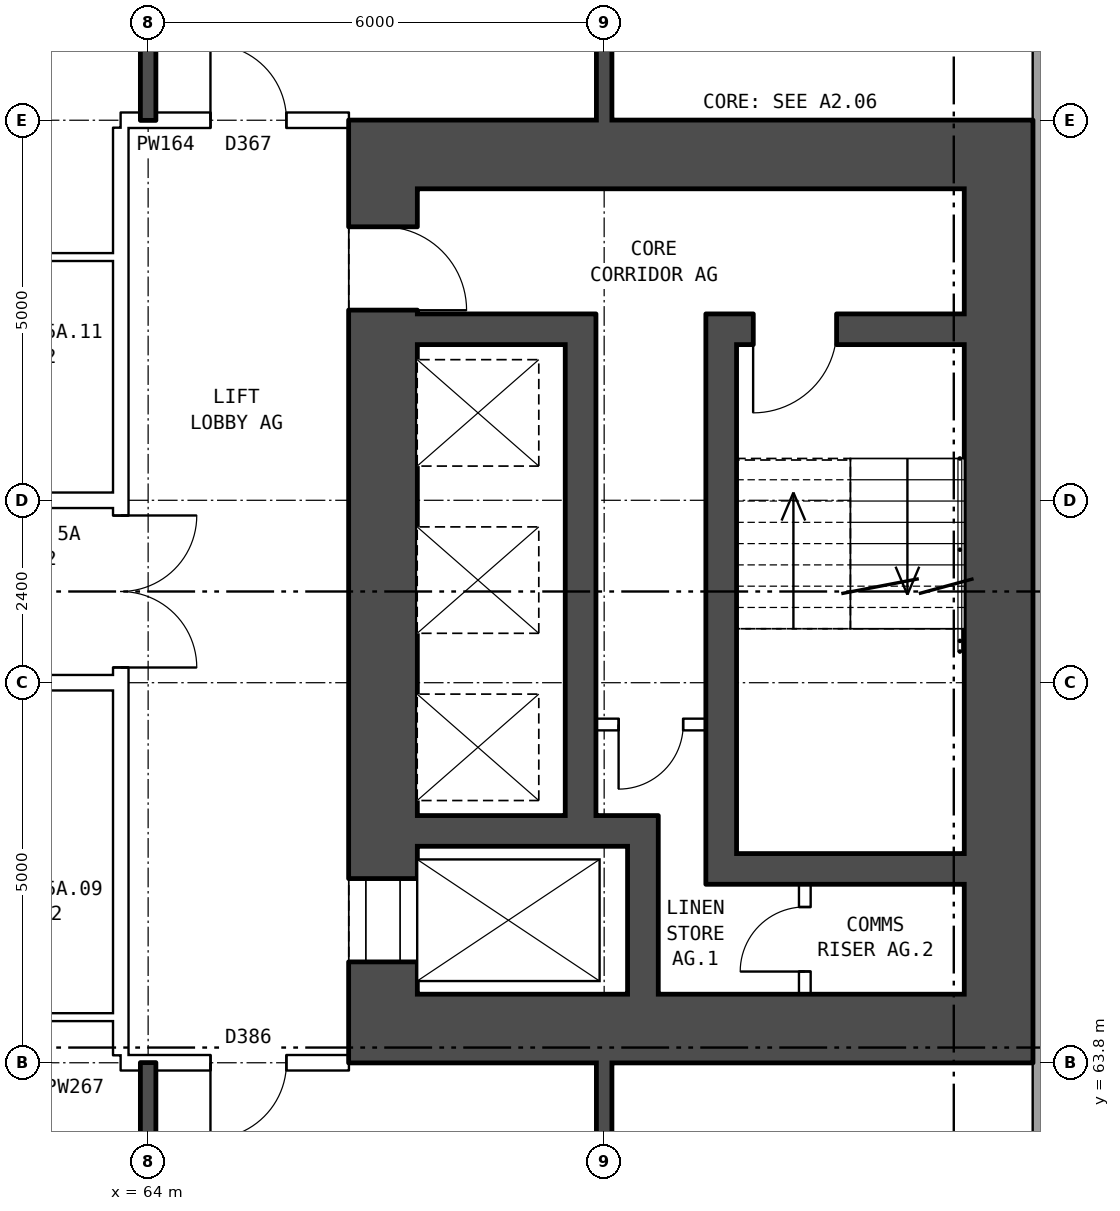
"""IFC4 building model, lengths in metres.
Left out: names, types, materials, properties, quantities, classifications, styles, units other than length and angle.
Written with IfcOpenShell. Run it as: python <this file> out.ifc"""

import sys

from ifc_helpers import new_model, si_unit, direction, frame, frame_2d, origin, place, context, subcontext, project, spatial, rectangle, extrude, element, fill, save


model = new_model("IFC4")
c1 = context("Model", 3, precision=1e-05, world=origin(), true_north=direction((0.0, 1.0)))
c2 = subcontext(c1, "Body", "Model", "MODEL_VIEW")
j1 = project(units=[si_unit("LENGTHUNIT", "METRE"), si_unit("PLANEANGLEUNIT", "RADIAN")], contexts=[c1])
p1 = place(None, origin())
s1 = spatial("IfcSite", under=j1, at=p1, CompositionType="ELEMENT")
p2 = place(p1, origin())
s2 = spatial("IfcBuilding", under=s1, at=p2, CompositionType="ELEMENT")
p3 = place(p2, frame((0.0, 0.0, 22.6)))
s3 = spatial("IfcBuildingStorey", under=s2, at=p3, CompositionType="ELEMENT", Elevation=22.6)
p4 = place(p3, frame((75.82, 57.075, 0.0), z_axis=(0.0, 0.0, 1.0), x_axis=(0.0, 1.0, 0.0)))
e1 = element("IfcWall", 1, at=p4, inside=s3, PredefinedType="STANDARD", context=c2, shape_type="SweptSolid", body=[
    extrude(rectangle(XDim=25.851, YDim=0.36, at=frame_2d((12.925, 0.0))), origin(), (0.0, 0.0, 1.0), 2.85),
])
p5 = place(p4, frame((1.625, 0.0, 0.8)))
e2 = element("IfcOpeningElement", 2, at=p5, cuts=e1, PredefinedType="OPENING", context=c2, shape_type="SweptSolid", body=[
    extrude(rectangle(XDim=1.6, YDim=1.8, at=frame_2d((0.8, 0.9))), frame((0.0, 0.19, 0.0), z_axis=(0.0, -1.0, 0.0), x_axis=(1.0, 0.0, 0.0)), (0.0, 0.0, 1.0), 0.38),
])
p6 = place(p4, frame((3.525, 0.0, 1.7)))
e3 = element("IfcOpeningElement", 3, at=p6, cuts=e1, PredefinedType="OPENING", context=c2, shape_type="SweptSolid", body=[
    extrude(rectangle(XDim=1.4, YDim=0.9, at=frame_2d((0.7, 0.45))), frame((0.0, 0.19, 0.0), z_axis=(0.0, -1.0, 0.0), x_axis=(1.0, 0.0, 0.0)), (0.0, 0.0, 1.0), 0.38),
])
p7 = place(p4, frame((20.825, 0.0, 1.7)))
e4 = element("IfcOpeningElement", 4, at=p7, cuts=e1, PredefinedType="OPENING", context=c2, shape_type="SweptSolid", body=[
    extrude(rectangle(XDim=1.4, YDim=0.9, at=frame_2d((0.7, 0.45))), frame((0.0, 0.19, 0.0), z_axis=(0.0, -1.0, 0.0), x_axis=(1.0, 0.0, 0.0)), (0.0, 0.0, 1.0), 0.38),
])
p8 = place(p4, frame((22.625, 0.0, 0.8)))
e5 = element("IfcOpeningElement", 5, at=p8, cuts=e1, PredefinedType="OPENING", context=c2, shape_type="SweptSolid", body=[
    extrude(rectangle(XDim=1.6, YDim=1.8, at=frame_2d((0.8, 0.9))), frame((0.0, 0.19, 0.0), z_axis=(0.0, -1.0, 0.0), x_axis=(1.0, 0.0, 0.0)), (0.0, 0.0, 1.0), 0.38),
])
p9 = place(p3, frame((67.09, 64.7, 0.0), z_axis=(0.0, 0.0, 1.0), x_axis=(0.0, 1.0, 0.0)))
e6 = element("IfcWall", 6, at=p9, inside=s3, PredefinedType="SHEAR", context=c2, shape_type="SweptSolid", body=[
    extrude(rectangle(XDim=10.6, YDim=0.9, at=frame_2d((5.3, 0.0))), origin(), (0.0, 0.0, 1.0), 2.85),
])
p10 = place(p9, frame((0.425, 0.0, 0.0)))
e7 = element("IfcOpeningElement", 7, at=p10, cuts=e6, PredefinedType="OPENING", context=c2, shape_type="SweptSolid", body=[
    extrude(rectangle(XDim=1.1, YDim=2.1, at=frame_2d((0.55, 1.05))), frame((0.0, 0.46, 0.0), z_axis=(0.0, -1.0, 0.0), x_axis=(1.0, 0.0, 0.0)), (0.0, 0.0, 1.0), 0.92),
])
p11 = place(p9, frame((9.0, 0.0, 0.0)))
e8 = element("IfcOpeningElement", 8, at=p11, cuts=e6, PredefinedType="OPENING", context=c2, shape_type="SweptSolid", body=[
    extrude(rectangle(XDim=1.1, YDim=2.1, at=frame_2d((0.55, 1.05))), frame((0.0, 0.46, 0.0), z_axis=(0.0, -1.0, 0.0), x_axis=(1.0, 0.0, 0.0)), (0.0, 0.0, 1.0), 0.92),
])
p12 = place(p3, frame((75.19, 64.7, 0.0), z_axis=(0.0, 0.0, 1.0), x_axis=(0.0, 1.0, 0.0)))
e9 = element("IfcWall", 9, at=p12, inside=s3, PredefinedType="SHEAR", context=c2, shape_type="SweptSolid", body=[
    extrude(rectangle(XDim=10.6, YDim=0.9, at=frame_2d((5.3, 0.0))), origin(), (0.0, 0.0, 1.0), 2.85),
])
for number, where, z_axis, x_axis in (
    (10, (66.64, 64.25, 0.0), (0.0, 0.0, 1.0), (1.0, 0.0, 0.0)),
    (11, (66.64, 75.75, 0.0), (0.0, 0.0, 1.0), (1.0, 0.0, 0.0)),
):
    element("IfcWall", number, at=place(p3, frame(where, z_axis=z_axis, x_axis=x_axis)), inside=s3, PredefinedType="SHEAR", context=c2, shape_type="SweptSolid", body=[
        extrude(rectangle(XDim=9.0, YDim=0.9, at=frame_2d((4.5, 0.0))), origin(), (0.0, 0.0, 1.0), 2.85),
    ])
p13 = place(p3, frame((71.74, 66.35, 0.0), z_axis=(0.0, 0.0, 1.0), x_axis=(1.0, 0.0, 0.0)))
e12 = element("IfcWall", 12, at=p13, inside=s3, PredefinedType="SHEAR", context=c2, shape_type="SweptSolid", body=[
    extrude(rectangle(XDim=3.0, YDim=0.4, at=frame_2d((1.5, 0.0))), origin(), (0.0, 0.0, 1.0), 2.85),
])
p14 = place(p3, frame((67.54, 66.85, 0.0), z_axis=(0.0, 0.0, 1.0), x_axis=(1.0, 0.0, 0.0)))
e13 = element("IfcWall", 13, at=p14, inside=s3, PredefinedType="SHEAR", context=c2, shape_type="SweptSolid", body=[
    extrude(rectangle(XDim=3.17, YDim=0.4, at=frame_2d((1.585, 0.0))), origin(), (0.0, 0.0, 1.0), 2.85),
])
p15 = place(p3, frame((69.89, 68.25, 0.0), z_axis=(0.0, 0.0, 1.0), x_axis=(1.0, 0.0, 0.0)))
e14 = element("IfcWall", 14, at=p15, inside=s3, PredefinedType="PARTITIONING", context=c2, shape_type="SweptSolid", body=[
    extrude(rectangle(XDim=1.45, YDim=0.15, at=frame_2d((0.725, 0.0))), origin(), (0.0, 0.0, 1.0), 2.85),
])
p16 = place(p15, frame((0.3, 0.0, 0.0)))
e15 = element("IfcOpeningElement", 15, at=p16, cuts=e14, PredefinedType="OPENING", context=c2, shape_type="SweptSolid", body=[
    extrude(rectangle(XDim=0.85, YDim=2.1, at=frame_2d((0.425, 1.05))), frame((0.0, 0.085, 0.0), z_axis=(0.0, -1.0, 0.0), x_axis=(1.0, 0.0, 0.0)), (0.0, 0.0, 1.0), 0.17),
])
p17 = place(p3, frame((67.54, 73.45, 0.0), z_axis=(0.0, 0.0, 1.0), x_axis=(1.0, 0.0, 0.0)))
e16 = element("IfcWall", 16, at=p17, inside=s3, PredefinedType="SHEAR", context=c2, shape_type="SweptSolid", body=[
    extrude(rectangle(XDim=1.95, YDim=0.4, at=frame_2d((0.975, 0.0))), origin(), (0.0, 0.0, 1.0), 2.85),
])
p18 = place(p3, frame((71.74, 73.45, 0.0), z_axis=(0.0, 0.0, 1.0), x_axis=(1.0, 0.0, 0.0)))
e17 = element("IfcWall", 17, at=p18, inside=s3, PredefinedType="SHEAR", context=c2, shape_type="SweptSolid", body=[
    extrude(rectangle(XDim=3.0, YDim=0.4, at=frame_2d((1.5, 0.0))), origin(), (0.0, 0.0, 1.0), 2.85),
])
p19 = place(p18, frame((0.22, 0.0, 0.0)))
e18 = element("IfcOpeningElement", 18, at=p19, cuts=e17, PredefinedType="OPENING", context=c2, shape_type="SweptSolid", body=[
    extrude(rectangle(XDim=1.1, YDim=2.1, at=frame_2d((0.55, 1.05))), frame((0.0, 0.21, 0.0), z_axis=(0.0, -1.0, 0.0), x_axis=(1.0, 0.0, 0.0)), (0.0, 0.0, 1.0), 0.42),
])
p20 = place(p3, frame((69.69, 67.05, 0.0), z_axis=(0.0, 0.0, 1.0), x_axis=(0.0, 1.0, 0.0)))
e19 = element("IfcWall", 19, at=p20, inside=s3, PredefinedType="SHEAR", context=c2, shape_type="SweptSolid", body=[
    extrude(rectangle(XDim=6.6, YDim=0.4, at=frame_2d((3.3, 0.0))), origin(), (0.0, 0.0, 1.0), 2.85),
])
p21 = place(p3, frame((70.51, 64.7, 0.0), z_axis=(0.0, 0.0, 1.0), x_axis=(0.0, 1.0, 0.0)))
e20 = element("IfcWall", 20, at=p21, inside=s3, PredefinedType="SHEAR", context=c2, shape_type="SweptSolid", body=[
    extrude(rectangle(XDim=1.95, YDim=0.4, at=frame_2d((0.975, 0.0))), origin(), (0.0, 0.0, 1.0), 2.85),
])
p22 = place(p3, frame((71.54, 66.15, 0.0), z_axis=(0.0, 0.0, 1.0), x_axis=(0.0, 1.0, 0.0)))
e21 = element("IfcWall", 21, at=p22, inside=s3, PredefinedType="SHEAR", context=c2, shape_type="SweptSolid", body=[
    extrude(rectangle(XDim=7.5, YDim=0.4, at=frame_2d((3.75, 0.0))), origin(), (0.0, 0.0, 1.0), 2.85),
])
p23 = place(p3, frame((72.64, 64.7, 0.0), z_axis=(0.0, 0.0, 1.0), x_axis=(0.0, 1.0, 0.0)))
e22 = element("IfcWall", 22, at=p23, inside=s3, PredefinedType="PARTITIONING", context=c2, shape_type="SweptSolid", body=[
    extrude(rectangle(XDim=1.45, YDim=0.15, at=frame_2d((0.725, 0.0))), origin(), (0.0, 0.0, 1.0), 2.85),
])
p24 = place(p23, frame((0.3, 0.0, 0.0)))
e23 = element("IfcOpeningElement", 23, at=p24, cuts=e22, PredefinedType="OPENING", context=c2, shape_type="SweptSolid", body=[
    extrude(rectangle(XDim=0.85, YDim=2.1, at=frame_2d((0.425, 1.05))), frame((0.0, 0.085, 0.0), z_axis=(0.0, -1.0, 0.0), x_axis=(1.0, 0.0, 0.0)), (0.0, 0.0, 1.0), 0.17),
])
p25 = place(p3, frame((63.64, 63.9, 0.0), z_axis=(0.0, 0.0, 1.0), x_axis=(0.0, 1.0, 0.0)))
e24 = element("IfcWall", 24, at=p25, inside=s3, PredefinedType="PARTITIONING", context=c2, shape_type="SweptSolid", body=[
    extrude(rectangle(XDim=12.2, YDim=0.2, at=frame_2d((6.1, 0.0))), origin(), (0.0, 0.0, 1.0), 2.85),
])
p26 = place(p25, frame((5.1, 0.0, 0.0)))
e25 = element("IfcOpeningElement", 25, at=p26, cuts=e24, PredefinedType="OPENING", context=c2, shape_type="SweptSolid", body=[
    extrude(rectangle(XDim=2.0, YDim=2.1, at=frame_2d((1.0, 1.05))), frame((0.0, 0.11, 0.0), z_axis=(0.0, -1.0, 0.0), x_axis=(1.0, 0.0, 0.0)), (0.0, 0.0, 1.0), 0.22),
])
p27 = place(p3, frame((63.64, 63.8, 0.0), z_axis=(0.0, 0.0, 1.0), x_axis=(1.0, 0.0, 0.0)))
e26 = element("IfcWall", 26, at=p27, inside=s3, PredefinedType="PARTITIONING", context=c2, shape_type="SweptSolid", body=[
    extrude(rectangle(XDim=3.0, YDim=0.2, at=frame_2d((1.5, 0.0))), origin(), (0.0, 0.0, 1.0), 2.85),
])
p28 = place(p27, frame((1.18, 0.0, 0.0)))
e27 = element("IfcOpeningElement", 27, at=p28, cuts=e26, PredefinedType="OPENING", context=c2, shape_type="SweptSolid", body=[
    extrude(rectangle(XDim=1.0, YDim=2.1, at=frame_2d((0.5, 1.05))), frame((0.0, 0.11, 0.0), z_axis=(0.0, -1.0, 0.0), x_axis=(1.0, 0.0, 0.0)), (0.0, 0.0, 1.0), 0.22),
])
p29 = place(p3, frame((61.0, 64.4, 0.0), z_axis=(0.0, 0.0, 1.0), x_axis=(1.0, 0.0, 0.0)))
e28 = element("IfcWall", 28, at=p29, inside=s3, PredefinedType="PARTITIONING", context=c2, shape_type="SweptSolid", body=[
    extrude(rectangle(XDim=2.64, YDim=0.1, at=frame_2d((1.32, 0.0))), origin(), (0.0, 0.0, 1.0), 2.85),
])
p30 = place(p3, frame((44.36, 68.8, 0.0), z_axis=(0.0, 0.0, 1.0), x_axis=(1.0, 0.0, 0.0)))
e29 = element("IfcWall", 29, at=p30, inside=s3, PredefinedType="PARTITIONING", context=c2, shape_type="SweptSolid", body=[
    extrude(rectangle(XDim=19.28, YDim=0.2, at=frame_2d((9.64, 0.0))), origin(), (0.0, 0.0, 1.0), 2.85),
])
p31 = place(p30, frame((14.64, 0.0, 0.0)))
e30 = element("IfcOpeningElement", 30, at=p31, cuts=e29, PredefinedType="OPENING", context=c2, shape_type="SweptSolid", body=[
    extrude(rectangle(XDim=1.0, YDim=2.1, at=frame_2d((0.5, 1.05))), frame((0.0, 0.11, 0.0), z_axis=(0.0, -1.0, 0.0), x_axis=(1.0, 0.0, 0.0)), (0.0, 0.0, 1.0), 0.22),
])
p32 = place(p30, frame((5.64, 0.0, 0.0)))
e31 = element("IfcOpeningElement", 31, at=p32, cuts=e29, PredefinedType="OPENING", context=c2, shape_type="SweptSolid", body=[
    extrude(rectangle(XDim=1.0, YDim=2.1, at=frame_2d((0.5, 1.05))), frame((0.0, 0.11, 0.0), z_axis=(0.0, -1.0, 0.0), x_axis=(1.0, 0.0, 0.0)), (0.0, 0.0, 1.0), 0.22),
])
p33 = place(p3, frame((44.36, 71.2, 0.0), z_axis=(0.0, 0.0, 1.0), x_axis=(1.0, 0.0, 0.0)))
e32 = element("IfcWall", 32, at=p33, inside=s3, PredefinedType="PARTITIONING", context=c2, shape_type="SweptSolid", body=[
    extrude(rectangle(XDim=19.28, YDim=0.2, at=frame_2d((9.64, 0.0))), origin(), (0.0, 0.0, 1.0), 2.85),
])
p34 = place(p33, frame((14.64, 0.0, 0.0)))
e33 = element("IfcOpeningElement", 33, at=p34, cuts=e32, PredefinedType="OPENING", context=c2, shape_type="SweptSolid", body=[
    extrude(rectangle(XDim=1.0, YDim=2.1, at=frame_2d((0.5, 1.05))), frame((0.0, 0.11, 0.0), z_axis=(0.0, -1.0, 0.0), x_axis=(1.0, 0.0, 0.0)), (0.0, 0.0, 1.0), 0.22),
])
p35 = place(p33, frame((5.64, 0.0, 0.0)))
e34 = element("IfcOpeningElement", 34, at=p35, cuts=e32, PredefinedType="OPENING", context=c2, shape_type="SweptSolid", body=[
    extrude(rectangle(XDim=1.0, YDim=2.1, at=frame_2d((0.5, 1.05))), frame((0.0, 0.11, 0.0), z_axis=(0.0, -1.0, 0.0), x_axis=(1.0, 0.0, 0.0)), (0.0, 0.0, 1.0), 0.22),
])
p36 = place(p3, frame((61.0, 74.4, 0.0), z_axis=(0.0, 0.0, 1.0), x_axis=(1.0, 0.0, 0.0)))
e35 = element("IfcWall", 35, at=p36, inside=s3, PredefinedType="PARTITIONING", context=c2, shape_type="SweptSolid", body=[
    extrude(rectangle(XDim=2.64, YDim=0.1, at=frame_2d((1.32, 0.0))), origin(), (0.0, 0.0, 1.0), 2.85),
])
p37 = place(p3, frame((63.64, 76.2, 0.0), z_axis=(0.0, 0.0, 1.0), x_axis=(1.0, 0.0, 0.0)))
e36 = element("IfcWall", 36, at=p37, inside=s3, PredefinedType="PARTITIONING", context=c2, shape_type="SweptSolid", body=[
    extrude(rectangle(XDim=3.0, YDim=0.2, at=frame_2d((1.5, 0.0))), origin(), (0.0, 0.0, 1.0), 2.85),
])
p38 = place(p37, frame((1.18, 0.0, 0.0)))
e37 = element("IfcOpeningElement", 37, at=p38, cuts=e36, PredefinedType="OPENING", context=c2, shape_type="SweptSolid", body=[
    extrude(rectangle(XDim=1.0, YDim=2.1, at=frame_2d((0.5, 1.05))), frame((0.0, 0.11, 0.0), z_axis=(0.0, -1.0, 0.0), x_axis=(1.0, 0.0, 0.0)), (0.0, 0.0, 1.0), 0.22),
])
for number, where, z_axis, x_axis in (
    (38, (64.0, 54.36, 0.0), (0.0, 0.0, 1.0), (0.0, 1.0, 0.0)),
    (39, (64.0, 76.2, 0.0), (0.0, 0.0, 1.0), (0.0, 1.0, 0.0)),
):
    element("IfcWall", number, at=place(p3, frame(where, z_axis=z_axis, x_axis=x_axis)), inside=s3, PredefinedType="SOLIDWALL", context=c2, shape_type="SweptSolid", body=[
        extrude(rectangle(XDim=9.44, YDim=0.2, at=frame_2d((4.72, 0.0))), origin(), (0.0, 0.0, 1.0), 2.85),
    ])
p39 = place(p3, frame((70.0, 54.36, 0.0), z_axis=(0.0, 0.0, 1.0), x_axis=(0.0, 1.0, 0.0)))
e40 = element("IfcWall", 40, at=p39, inside=s3, PredefinedType="SOLIDWALL", context=c2, shape_type="SweptSolid", body=[
    extrude(rectangle(XDim=9.44, YDim=0.2, at=frame_2d((4.72, 0.0))), origin(), (0.0, 0.0, 1.0), 2.85),
])
p40 = place(p39, frame((7.04, 0.0, 0.0)))
e41 = element("IfcOpeningElement", 41, at=p40, cuts=e40, PredefinedType="OPENING", context=c2, shape_type="SweptSolid", body=[
    extrude(rectangle(XDim=0.9, YDim=2.1, at=frame_2d((0.45, 1.05))), frame((0.0, 0.11, 0.0), z_axis=(0.0, -1.0, 0.0), x_axis=(1.0, 0.0, 0.0)), (0.0, 0.0, 1.0), 0.22),
])
p41 = place(p3, frame((70.0, 76.2, 0.0), z_axis=(0.0, 0.0, 1.0), x_axis=(0.0, 1.0, 0.0)))
e42 = element("IfcWall", 42, at=p41, inside=s3, PredefinedType="SOLIDWALL", context=c2, shape_type="SweptSolid", body=[
    extrude(rectangle(XDim=9.44, YDim=0.2, at=frame_2d((4.72, 0.0))), origin(), (0.0, 0.0, 1.0), 2.85),
])
p42 = place(p41, frame((1.5, 0.0, 0.0)))
e43 = element("IfcOpeningElement", 43, at=p42, cuts=e42, PredefinedType="OPENING", context=c2, shape_type="SweptSolid", body=[
    extrude(rectangle(XDim=0.9, YDim=2.1, at=frame_2d((0.45, 1.05))), frame((0.0, 0.11, 0.0), z_axis=(0.0, -1.0, 0.0), x_axis=(1.0, 0.0, 0.0)), (0.0, 0.0, 1.0), 0.22),
])
p43 = place(p10, origin())
e44 = element("IfcDoor", 44, at=p43, inside=s3, OperationType="DOUBLE_DOOR_SLIDING", PredefinedType="DOOR", context=c2, shape_type="SweptSolid", body=[
    extrude(rectangle(XDim=1.1, YDim=2.1, at=frame_2d((0.55, 1.05))), frame((0.0, -0.385, 0.0), z_axis=(0.0, -1.0, 0.0), x_axis=(1.0, 0.0, 0.0)), (0.0, 0.0, 1.0), 0.05),
])
fill(e7, e44)
p44 = place(p11, frame((1.1, 0.0, 0.0), z_axis=(0.0, 0.0, 1.0), x_axis=(-1.0, 0.0, 0.0)))
e45 = element("IfcDoor", 45, at=p44, inside=s3, OperationType="SINGLE_SWING_RIGHT", PredefinedType="DOOR", context=c2, shape_type="SweptSolid", body=[
    extrude(rectangle(XDim=1.1, YDim=2.1, at=frame_2d((0.55, 1.05))), frame((0.0, 0.435, 0.0), z_axis=(0.0, -1.0, 0.0), x_axis=(1.0, 0.0, 0.0)), (0.0, 0.0, 1.0), 0.05),
])
fill(e8, e45)
p45 = place(p19, frame((1.1, 0.0, 0.0), z_axis=(0.0, 0.0, 1.0), x_axis=(-1.0, 0.0, 0.0)))
e46 = element("IfcDoor", 46, at=p45, inside=s3, OperationType="SINGLE_SWING_RIGHT", PredefinedType="DOOR", context=c2, shape_type="SweptSolid", body=[
    extrude(rectangle(XDim=1.1, YDim=2.1, at=frame_2d((0.55, 1.05))), frame((0.0, 0.025, 0.0), z_axis=(0.0, -1.0, 0.0), x_axis=(1.0, 0.0, 0.0)), (0.0, 0.0, 1.0), 0.05),
])
fill(e18, e46)
p46 = place(p16, frame((0.85, 0.0, 0.0), z_axis=(0.0, 0.0, 1.0), x_axis=(-1.0, 0.0, 0.0)))
e47 = element("IfcDoor", 47, at=p46, inside=s3, OperationType="SINGLE_SWING_RIGHT", PredefinedType="DOOR", context=c2, shape_type="SweptSolid", body=[
    extrude(rectangle(XDim=0.85, YDim=2.1, at=frame_2d((0.425, 1.05))), frame((0.0, 0.025, 0.0), z_axis=(0.0, -1.0, 0.0), x_axis=(1.0, 0.0, 0.0)), (0.0, 0.0, 1.0), 0.05),
])
fill(e15, e47)
p47 = place(p24, origin())
e48 = element("IfcDoor", 48, at=p47, inside=s3, OperationType="SINGLE_SWING_LEFT", PredefinedType="DOOR", context=c2, shape_type="SweptSolid", body=[
    extrude(rectangle(XDim=0.85, YDim=2.1, at=frame_2d((0.425, 1.05))), frame((0.0, 0.025, 0.0), z_axis=(0.0, -1.0, 0.0), x_axis=(1.0, 0.0, 0.0)), (0.0, 0.0, 1.0), 0.05),
])
fill(e23, e48)
p48 = place(p26, frame((2.0, 0.0, 0.0), z_axis=(0.0, 0.0, 1.0), x_axis=(-1.0, 0.0, 0.0)))
e49 = element("IfcDoor", 49, at=p48, inside=s3, OperationType="DOUBLE_DOOR_SINGLE_SWING", PredefinedType="DOOR", context=c2, shape_type="SweptSolid", body=[
    extrude(rectangle(XDim=2.0, YDim=2.1, at=frame_2d((1.0, 1.05))), frame((0.0, 0.025, 0.0), z_axis=(0.0, -1.0, 0.0), x_axis=(1.0, 0.0, 0.0)), (0.0, 0.0, 1.0), 0.05),
])
fill(e25, e49)
p49 = place(p28, frame((1.0, 0.0, 0.0), z_axis=(0.0, 0.0, 1.0), x_axis=(-1.0, 0.0, 0.0)))
e50 = element("IfcDoor", 50, at=p49, inside=s3, OperationType="SINGLE_SWING_RIGHT", PredefinedType="DOOR", context=c2, shape_type="SweptSolid", body=[
    extrude(rectangle(XDim=1.0, YDim=2.1, at=frame_2d((0.5, 1.05))), frame((0.0, 0.025, 0.0), z_axis=(0.0, -1.0, 0.0), x_axis=(1.0, 0.0, 0.0)), (0.0, 0.0, 1.0), 0.05),
])
fill(e27, e50)
p50 = place(p38, origin())
e51 = element("IfcDoor", 51, at=p50, inside=s3, OperationType="SINGLE_SWING_LEFT", PredefinedType="DOOR", context=c2, shape_type="SweptSolid", body=[
    extrude(rectangle(XDim=1.0, YDim=2.1, at=frame_2d((0.5, 1.05))), frame((0.0, 0.025, 0.0), z_axis=(0.0, -1.0, 0.0), x_axis=(1.0, 0.0, 0.0)), (0.0, 0.0, 1.0), 0.05),
])
fill(e37, e51)
save(model, sys.argv[1])
